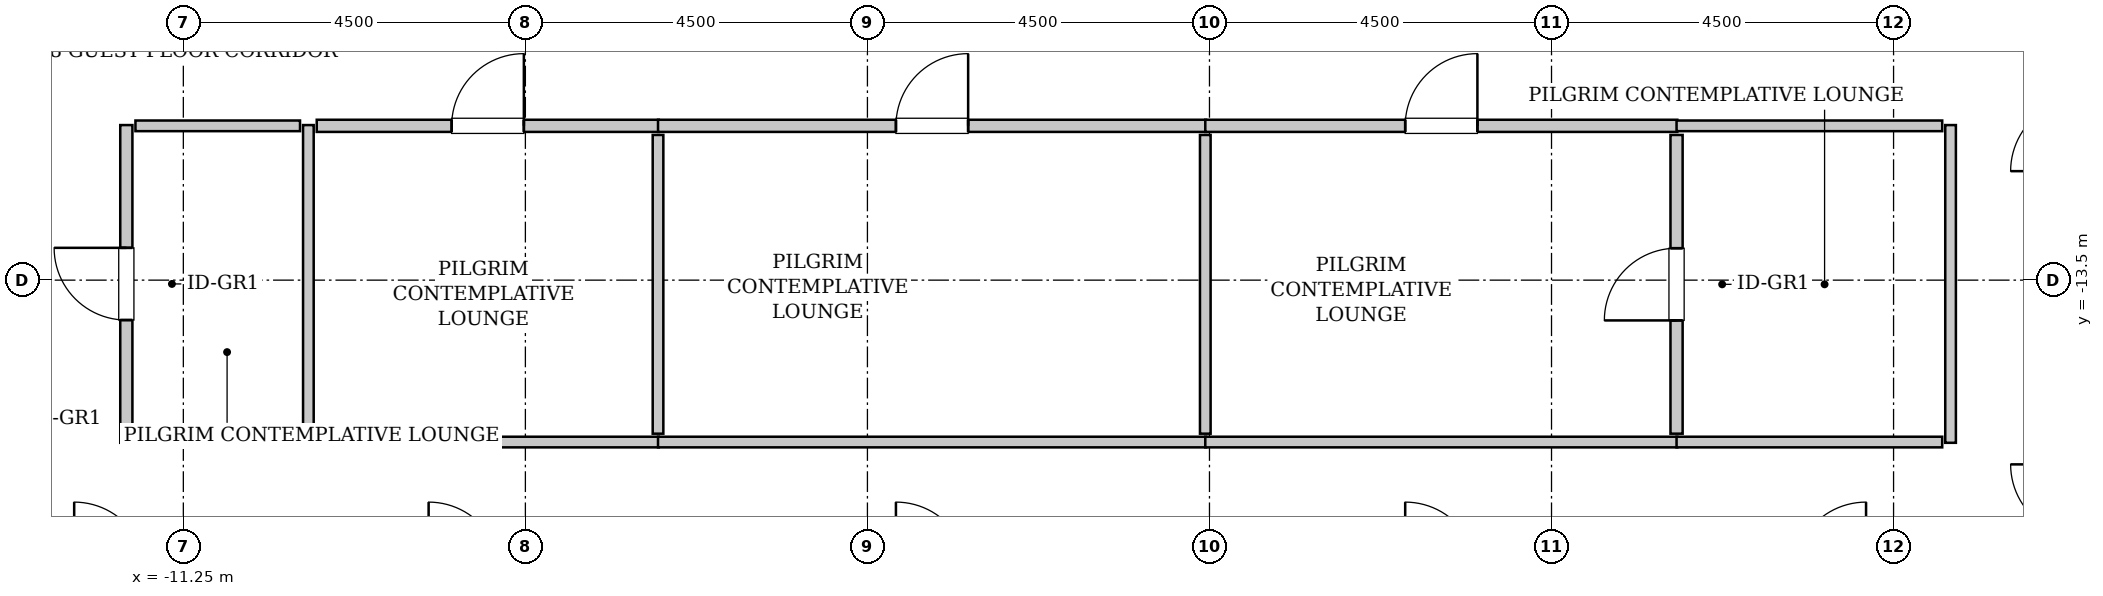
"""IFC4 building model, lengths in metres.
Left out: names, types, materials, properties, quantities, classifications, styles, units other than length and angle.
Written with IfcOpenShell. Run it as: python <this file> out.ifc"""

import sys

from ifc_helpers import new_model, si_unit, direction, frame, frame_2d, origin, place, context, subcontext, project, spatial, rectangle, extrude, source, transform, mapped, element, fill, save


model = new_model("IFC4")
c1 = context("Model", 3, precision=1e-05, world=origin(), true_north=direction((0.0, 1.0)))
c2 = subcontext(c1, "Body", "Model", "MODEL_VIEW")
j1 = project(units=[si_unit("LENGTHUNIT", "METRE"), si_unit("PLANEANGLEUNIT", "RADIAN")], contexts=[c1])
p1 = place(None, origin())
s1 = spatial("IfcSite", under=j1, at=p1, CompositionType="ELEMENT")
p2 = place(p1, origin())
s2 = spatial("IfcBuilding", under=s1, at=p2, CompositionType="ELEMENT")
p3 = place(p2, frame((0.0, 0.0, 233.2)))
s3 = spatial("IfcBuildingStorey", under=s2, at=p3, CompositionType="ELEMENT", Elevation=233.2)
m1 = source(origin(), c2, "Body", "SweptSolid", [
    extrude(rectangle(XDim=4.18, YDim=0.16, at=frame_2d((2.09, 0.0))), origin(), (0.0, 0.0, 1.0), 3.535),
])
p4 = place(p3, frame((-12.0, -15.64, 0.0), z_axis=(0.0, 0.0, 1.0), x_axis=(0.0, 1.0, 0.0)))
e1 = element("IfcWall", 1, at=p4, inside=s3, PredefinedType="PARTITIONING", context=c2, shape_type="MappedRepresentation", body=[
    mapped(m1, transform((0.0, 0.0, 0.0), x_axis=(1.0, 0.0, 0.0), y_axis=(0.0, 1.0, 0.0), z_axis=(0.0, 0.0, 1.0), scale=1.0)),
])
p5 = place(p4, frame((1.615, 0.0, 0.0)))
e2 = element("IfcOpeningElement", 2, at=p5, cuts=e1, PredefinedType="OPENING", context=c2, shape_type="SweptSolid", body=[
    extrude(rectangle(XDim=0.95, YDim=2.1, at=frame_2d((0.475, 1.05))), frame((0.0, 0.09, 0.0), z_axis=(0.0, -1.0, 0.0), x_axis=(1.0, 0.0, 0.0)), (0.0, 0.0, 1.0), 0.18),
])
m2 = source(origin(), c2, "Body", "SweptSolid", [
    extrude(rectangle(XDim=4.18, YDim=0.14, at=frame_2d((2.09, 0.0))), origin(), (0.0, 0.0, 1.0), 3.535),
])
p6 = place(p3, frame((-9.605, -15.64, 0.0), z_axis=(0.0, 0.0, 1.0), x_axis=(0.0, 1.0, 0.0)))
e3 = element("IfcWall", 3, at=p6, inside=s3, PredefinedType="PARTITIONING", context=c2, shape_type="MappedRepresentation", body=[
    mapped(m2, transform((0.0, 0.0, 0.0), x_axis=(1.0, 0.0, 0.0), y_axis=(0.0, 1.0, 0.0), z_axis=(0.0, 0.0, 1.0), scale=1.0)),
])
m3 = source(origin(), c2, "Body", "SweptSolid", [
    extrude(rectangle(XDim=2.165, YDim=0.14, at=frame_2d((1.083, 0.0))), origin(), (0.0, 0.0, 1.0), 3.535),
])
for number, where, z_axis, x_axis in (
    (4, (-11.88, -11.47, 0.0), (0.0, 0.0, 1.0), (1.0, 0.0, 0.0)),
    (5, (-11.88, -15.63, 0.0), (0.0, 0.0, 1.0), (1.0, 0.0, 0.0)),
):
    element("IfcWall", number, at=place(p3, frame(where, z_axis=z_axis, x_axis=x_axis)), inside=s3, PredefinedType="PARTITIONING", context=c2, shape_type="MappedRepresentation", body=[
        mapped(m3, transform((0.0, 0.0, 0.0), x_axis=(1.0, 0.0, 0.0), y_axis=(0.0, 1.0, 0.0), z_axis=(0.0, 0.0, 1.0), scale=1.0)),
    ])
m4 = source(origin(), c2, "Body", "SweptSolid", [
    extrude(rectangle(XDim=4.5, YDim=0.16, at=frame_2d((2.25, 0.0))), origin(), (0.0, 0.0, 1.0), 3.535),
])
p7 = place(p3, frame((-9.495, -11.47, 0.0), z_axis=(0.0, 0.0, 1.0), x_axis=(1.0, 0.0, 0.0)))
e6 = element("IfcWall", 6, at=p7, inside=s3, PredefinedType="PARTITIONING", context=c2, shape_type="MappedRepresentation", body=[
    mapped(m4, transform((0.0, 0.0, 0.0), x_axis=(1.0, 0.0, 0.0), y_axis=(0.0, 1.0, 0.0), z_axis=(0.0, 0.0, 1.0), scale=1.0)),
])
p8 = place(p7, frame((1.775, 0.0, 0.0)))
e7 = element("IfcOpeningElement", 7, at=p8, cuts=e6, PredefinedType="OPENING", context=c2, shape_type="SweptSolid", body=[
    extrude(rectangle(XDim=0.95, YDim=2.1, at=frame_2d((0.475, 1.05))), frame((0.0, 0.09, 0.0), z_axis=(0.0, -1.0, 0.0), x_axis=(1.0, 0.0, 0.0)), (0.0, 0.0, 1.0), 0.18),
])
m5 = source(origin(), c2, "Body", "SweptSolid", [
    extrude(rectangle(XDim=4.5, YDim=0.14, at=frame_2d((2.25, 0.0))), origin(), (0.0, 0.0, 1.0), 3.535),
])
p9 = place(p3, frame((-9.495, -15.63, 0.0), z_axis=(0.0, 0.0, 1.0), x_axis=(1.0, 0.0, 0.0)))
e8 = element("IfcWall", 8, at=p9, inside=s3, PredefinedType="PARTITIONING", context=c2, shape_type="MappedRepresentation", body=[
    mapped(m5, transform((0.0, 0.0, 0.0), x_axis=(1.0, 0.0, 0.0), y_axis=(0.0, 1.0, 0.0), z_axis=(0.0, 0.0, 1.0), scale=1.0)),
])
m6 = source(origin(), c2, "Body", "SweptSolid", [
    extrude(rectangle(XDim=3.93, YDim=0.14, at=frame_2d((1.965, 0.0))), origin(), (0.0, 0.0, 1.0), 3.535),
])
p10 = place(p3, frame((-5.005, -15.52, 0.0), z_axis=(0.0, 0.0, 1.0), x_axis=(0.0, 1.0, 0.0)))
e9 = element("IfcWall", 9, at=p10, inside=s3, PredefinedType="PARTITIONING", context=c2, shape_type="MappedRepresentation", body=[
    mapped(m6, transform((0.0, 0.0, 0.0), x_axis=(1.0, 0.0, 0.0), y_axis=(0.0, 1.0, 0.0), z_axis=(0.0, 0.0, 1.0), scale=1.0)),
])
m7 = source(origin(), c2, "Body", "SweptSolid", [
    extrude(rectangle(XDim=7.21, YDim=0.16, at=frame_2d((3.605, 0.0))), origin(), (0.0, 0.0, 1.0), 3.535),
])
p11 = place(p3, frame((-5.005, -11.47, 0.0), z_axis=(0.0, 0.0, 1.0), x_axis=(1.0, 0.0, 0.0)))
e10 = element("IfcWall", 10, at=p11, inside=s3, PredefinedType="PARTITIONING", context=c2, shape_type="MappedRepresentation", body=[
    mapped(m7, transform((0.0, 0.0, 0.0), x_axis=(1.0, 0.0, 0.0), y_axis=(0.0, 1.0, 0.0), z_axis=(0.0, 0.0, 1.0), scale=1.0)),
])
p12 = place(p11, frame((3.13, 0.0, 0.0)))
e11 = element("IfcOpeningElement", 11, at=p12, cuts=e10, PredefinedType="OPENING", context=c2, shape_type="SweptSolid", body=[
    extrude(rectangle(XDim=0.95, YDim=2.1, at=frame_2d((0.475, 1.05))), frame((0.0, 0.09, 0.0), z_axis=(0.0, -1.0, 0.0), x_axis=(1.0, 0.0, 0.0)), (0.0, 0.0, 1.0), 0.18),
])
m8 = source(origin(), c2, "Body", "SweptSolid", [
    extrude(rectangle(XDim=7.21, YDim=0.14, at=frame_2d((3.605, 0.0))), origin(), (0.0, 0.0, 1.0), 3.535),
])
p13 = place(p3, frame((-5.005, -15.63, 0.0), z_axis=(0.0, 0.0, 1.0), x_axis=(1.0, 0.0, 0.0)))
e12 = element("IfcWall", 12, at=p13, inside=s3, PredefinedType="PARTITIONING", context=c2, shape_type="MappedRepresentation", body=[
    mapped(m8, transform((0.0, 0.0, 0.0), x_axis=(1.0, 0.0, 0.0), y_axis=(0.0, 1.0, 0.0), z_axis=(0.0, 0.0, 1.0), scale=1.0)),
])
p14 = place(p3, frame((2.195, -15.52, 0.0), z_axis=(0.0, 0.0, 1.0), x_axis=(0.0, 1.0, 0.0)))
e13 = element("IfcWall", 13, at=p14, inside=s3, PredefinedType="PARTITIONING", context=c2, shape_type="MappedRepresentation", body=[
    mapped(m6, transform((0.0, 0.0, 0.0), x_axis=(1.0, 0.0, 0.0), y_axis=(0.0, 1.0, 0.0), z_axis=(0.0, 0.0, 1.0), scale=1.0)),
])
m9 = source(origin(), c2, "Body", "SweptSolid", [
    extrude(rectangle(XDim=6.21, YDim=0.16, at=frame_2d((3.105, 0.0))), origin(), (0.0, 0.0, 1.0), 3.535),
])
p15 = place(p3, frame((2.195, -11.47, 0.0), z_axis=(0.0, 0.0, 1.0), x_axis=(1.0, 0.0, 0.0)))
e14 = element("IfcWall", 14, at=p15, inside=s3, PredefinedType="PARTITIONING", context=c2, shape_type="MappedRepresentation", body=[
    mapped(m9, transform((0.0, 0.0, 0.0), x_axis=(1.0, 0.0, 0.0), y_axis=(0.0, 1.0, 0.0), z_axis=(0.0, 0.0, 1.0), scale=1.0)),
])
p16 = place(p15, frame((2.63, 0.0, 0.0)))
e15 = element("IfcOpeningElement", 15, at=p16, cuts=e14, PredefinedType="OPENING", context=c2, shape_type="SweptSolid", body=[
    extrude(rectangle(XDim=0.95, YDim=2.1, at=frame_2d((0.475, 1.05))), frame((0.0, 0.09, 0.0), z_axis=(0.0, -1.0, 0.0), x_axis=(1.0, 0.0, 0.0)), (0.0, 0.0, 1.0), 0.18),
])
m10 = source(origin(), c2, "Body", "SweptSolid", [
    extrude(rectangle(XDim=6.21, YDim=0.14, at=frame_2d((3.105, 0.0))), origin(), (0.0, 0.0, 1.0), 3.535),
])
p17 = place(p3, frame((2.195, -15.63, 0.0), z_axis=(0.0, 0.0, 1.0), x_axis=(1.0, 0.0, 0.0)))
e16 = element("IfcWall", 16, at=p17, inside=s3, PredefinedType="PARTITIONING", context=c2, shape_type="MappedRepresentation", body=[
    mapped(m10, transform((0.0, 0.0, 0.0), x_axis=(1.0, 0.0, 0.0), y_axis=(0.0, 1.0, 0.0), z_axis=(0.0, 0.0, 1.0), scale=1.0)),
])
m11 = source(origin(), c2, "Body", "SweptSolid", [
    extrude(rectangle(XDim=3.93, YDim=0.16, at=frame_2d((1.965, 0.0))), origin(), (0.0, 0.0, 1.0), 3.535),
])
p18 = place(p3, frame((8.395, -15.52, 0.0), z_axis=(0.0, 0.0, 1.0), x_axis=(0.0, 1.0, 0.0)))
e17 = element("IfcWall", 17, at=p18, inside=s3, PredefinedType="PARTITIONING", context=c2, shape_type="MappedRepresentation", body=[
    mapped(m11, transform((0.0, 0.0, 0.0), x_axis=(1.0, 0.0, 0.0), y_axis=(0.0, 1.0, 0.0), z_axis=(0.0, 0.0, 1.0), scale=1.0)),
])
p19 = place(p18, frame((1.49, 0.0, 0.0)))
e18 = element("IfcOpeningElement", 18, at=p19, cuts=e17, PredefinedType="OPENING", context=c2, shape_type="SweptSolid", body=[
    extrude(rectangle(XDim=0.95, YDim=2.1, at=frame_2d((0.475, 1.05))), frame((0.0, 0.09, 0.0), z_axis=(0.0, -1.0, 0.0), x_axis=(1.0, 0.0, 0.0)), (0.0, 0.0, 1.0), 0.18),
])
p20 = place(p3, frame((12.0, -15.64, 0.0), z_axis=(0.0, 0.0, 1.0), x_axis=(0.0, 1.0, 0.0)))
e19 = element("IfcWall", 19, at=p20, inside=s3, PredefinedType="PARTITIONING", context=c2, shape_type="MappedRepresentation", body=[
    mapped(m2, transform((0.0, 0.0, 0.0), x_axis=(1.0, 0.0, 0.0), y_axis=(0.0, 1.0, 0.0), z_axis=(0.0, 0.0, 1.0), scale=1.0)),
])
m12 = source(origin(), c2, "Body", "SweptSolid", [
    extrude(rectangle(XDim=3.495, YDim=0.14, at=frame_2d((1.748, 0.0))), origin(), (0.0, 0.0, 1.0), 3.535),
])
for number, where, z_axis, x_axis in (
    (20, (8.395, -11.47, 0.0), (0.0, 0.0, 1.0), (1.0, 0.0, 0.0)),
    (21, (8.395, -15.63, 0.0), (0.0, 0.0, 1.0), (1.0, 0.0, 0.0)),
):
    element("IfcWall", number, at=place(p3, frame(where, z_axis=z_axis, x_axis=x_axis)), inside=s3, PredefinedType="PARTITIONING", context=c2, shape_type="MappedRepresentation", body=[
        mapped(m12, transform((0.0, 0.0, 0.0), x_axis=(1.0, 0.0, 0.0), y_axis=(0.0, 1.0, 0.0), z_axis=(0.0, 0.0, 1.0), scale=1.0)),
    ])
m13 = source(origin(), c2, "Body", "SweptSolid", [
    extrude(rectangle(XDim=0.95, YDim=2.1, at=frame_2d((0.475, 1.05))), frame((0.0, 0.025, 0.0), z_axis=(0.0, -1.0, 0.0), x_axis=(1.0, 0.0, 0.0)), (0.0, 0.0, 1.0), 0.05),
])
p21 = place(p5, origin())
e22 = element("IfcDoor", 22, at=p21, inside=s3, OperationType="SINGLE_SWING_RIGHT", PredefinedType="DOOR", context=c2, shape_type="MappedRepresentation", body=[
    mapped(m13, transform((0.0, 0.0, 0.0), x_axis=(1.0, 0.0, 0.0), y_axis=(0.0, 1.0, 0.0), z_axis=(0.0, 0.0, 1.0), scale=1.0)),
])
fill(e2, e22)
p22 = place(p8, origin())
e23 = element("IfcDoor", 23, at=p22, inside=s3, OperationType="SINGLE_SWING_RIGHT", PredefinedType="DOOR", context=c2, shape_type="MappedRepresentation", body=[
    mapped(m13, transform((0.0, 0.0, 0.0), x_axis=(1.0, 0.0, 0.0), y_axis=(0.0, 1.0, 0.0), z_axis=(0.0, 0.0, 1.0), scale=1.0)),
])
fill(e7, e23)
p23 = place(p12, origin())
e24 = element("IfcDoor", 24, at=p23, inside=s3, OperationType="SINGLE_SWING_RIGHT", PredefinedType="DOOR", context=c2, shape_type="MappedRepresentation", body=[
    mapped(m13, transform((0.0, 0.0, 0.0), x_axis=(1.0, 0.0, 0.0), y_axis=(0.0, 1.0, 0.0), z_axis=(0.0, 0.0, 1.0), scale=1.0)),
])
fill(e11, e24)
p24 = place(p16, origin())
e25 = element("IfcDoor", 25, at=p24, inside=s3, OperationType="SINGLE_SWING_RIGHT", PredefinedType="DOOR", context=c2, shape_type="MappedRepresentation", body=[
    mapped(m13, transform((0.0, 0.0, 0.0), x_axis=(1.0, 0.0, 0.0), y_axis=(0.0, 1.0, 0.0), z_axis=(0.0, 0.0, 1.0), scale=1.0)),
])
fill(e15, e25)
p25 = place(p19, origin())
e26 = element("IfcDoor", 26, at=p25, inside=s3, OperationType="SINGLE_SWING_LEFT", PredefinedType="DOOR", context=c2, shape_type="MappedRepresentation", body=[
    mapped(m13, transform((0.0, 0.0, 0.0), x_axis=(1.0, 0.0, 0.0), y_axis=(0.0, 1.0, 0.0), z_axis=(0.0, 0.0, 1.0), scale=1.0)),
])
fill(e18, e26)
save(model, sys.argv[1])
